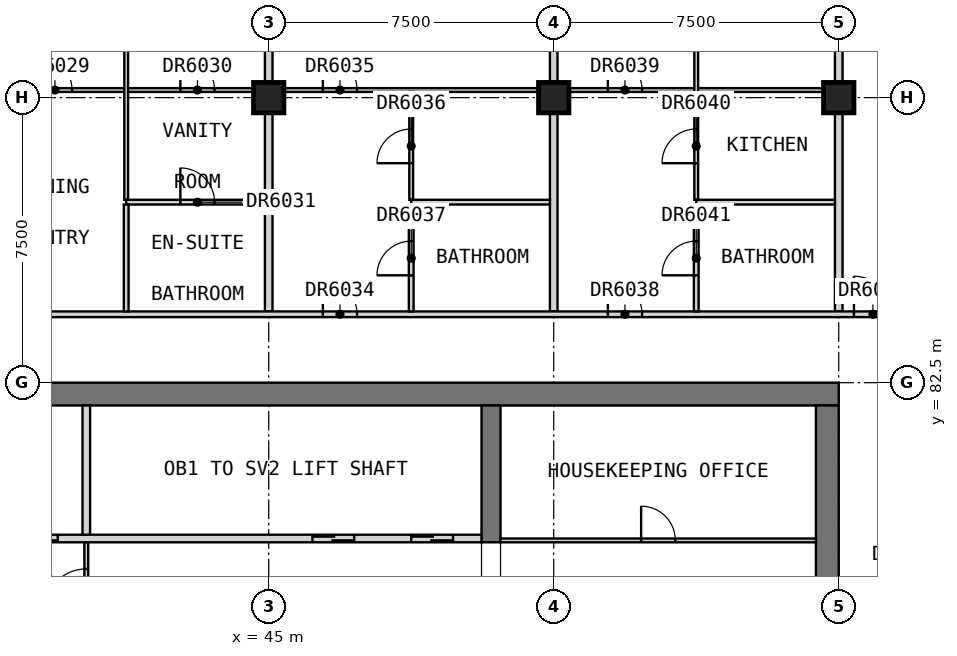
"""IFC4 building model, lengths in metres.
Left out: names, types, materials, properties, quantities, classifications, styles, units other than length and angle.
Written with IfcOpenShell. Run it as: python <this file> out.ifc"""

import sys

from ifc_helpers import new_model, si_unit, direction, frame, frame_2d, origin, origin_2d, place, context, subcontext, project, spatial, rectangle, extrude, element, fill, save


model = new_model("IFC4")
c1 = context("Model", 3, precision=1e-05, world=origin(), true_north=direction((0.0, 1.0)))
c2 = subcontext(c1, "Body", "Model", "MODEL_VIEW")
j1 = project(units=[si_unit("LENGTHUNIT", "METRE"), si_unit("PLANEANGLEUNIT", "RADIAN")], contexts=[c1])
p1 = place(None, origin())
s1 = spatial("IfcSite", under=j1, at=p1, CompositionType="ELEMENT")
p2 = place(p1, origin())
s2 = spatial("IfcBuilding", under=s1, at=p2, CompositionType="ELEMENT")
p3 = place(p2, frame((0.0, 0.0, 226.7)))
s3 = spatial("IfcBuildingStorey", under=s2, at=p3, CompositionType="ELEMENT", Elevation=226.7)
for number, where, z_axis, x_axis in (
    (1, (45.0, 90.0, 0.0), (0.0, 0.0, 1.0), (1.0, 0.0, 0.0)),
    (2, (52.5, 90.0, 0.0), (0.0, 0.0, 1.0), (1.0, 0.0, 0.0)),
    (3, (60.0, 90.0, 0.0), (0.0, 0.0, 1.0), (1.0, 0.0, 0.0)),
):
    element("IfcColumn", number, at=place(p3, frame(where, z_axis=z_axis, x_axis=x_axis)), inside=s3, PredefinedType="COLUMN", context=c2, shape_type="SweptSolid", body=[
        extrude(rectangle(XDim=0.8, YDim=0.8, at=origin_2d()), origin(), (0.0, 0.0, 1.0), 3.5),
    ])
p4 = place(p3, frame((30.0, 82.2, 0.0), z_axis=(0.0, 0.0, 1.0), x_axis=(1.0, 0.0, 0.0)))
e4 = element("IfcWall", 4, at=p4, inside=s3, PredefinedType="SHEAR", context=c2, shape_type="SweptSolid", body=[
    extrude(rectangle(XDim=30.0, YDim=0.6, at=frame_2d((15.0, 0.0))), origin(), (0.0, 0.0, 1.0), 3.5),
])
p5 = place(p3, frame((59.7, 60.6, 0.0), z_axis=(0.0, 0.0, 1.0), x_axis=(0.0, 1.0, 0.0)))
e5 = element("IfcWall", 5, at=p5, inside=s3, PredefinedType="SHEAR", context=c2, shape_type="SweptSolid", body=[
    extrude(rectangle(XDim=21.3, YDim=0.6, at=frame_2d((10.65, 0.0))), origin(), (0.0, 0.0, 1.0), 3.5),
])
p6 = place(p5, frame((14.9, 0.0, 0.0)))
e6 = element("IfcOpeningElement", 6, at=p6, cuts=e5, PredefinedType="OPENING", context=c2, shape_type="SweptSolid", body=[
    extrude(rectangle(XDim=1.8, YDim=2.1, at=frame_2d((0.9, 1.05))), frame((0.0, 0.31, 0.0), z_axis=(0.0, -1.0, 0.0), x_axis=(1.0, 0.0, 0.0)), (0.0, 0.0, 1.0), 0.62),
])
p7 = place(p3, frame((50.85, 78.3, 0.0), z_axis=(0.0, 0.0, 1.0), x_axis=(0.0, 1.0, 0.0)))
e7 = element("IfcWall", 7, at=p7, inside=s3, PredefinedType="SHEAR", context=c2, shape_type="SweptSolid", body=[
    extrude(rectangle(XDim=3.6, YDim=0.5, at=frame_2d((1.8, 0.0))), origin(), (0.0, 0.0, 1.0), 3.5),
])
p8 = place(p3, frame((35.0, 78.4, 0.0), z_axis=(0.0, 0.0, 1.0), x_axis=(1.0, 0.0, 0.0)))
e8 = element("IfcWall", 8, at=p8, inside=s3, PredefinedType="SOLIDWALL", context=c2, shape_type="SweptSolid", body=[
    extrude(rectangle(XDim=15.6, YDim=0.2, at=frame_2d((7.8, 0.0))), origin(), (0.0, 0.0, 1.0), 3.5),
])
p9 = place(p8, frame((0.75, 0.0, 0.0)))
e9 = element("IfcOpeningElement", 9, at=p9, cuts=e8, PredefinedType="OPENING", context=c2, shape_type="SweptSolid", body=[
    extrude(rectangle(XDim=1.1, YDim=2.1, at=frame_2d((0.55, 1.05))), frame((0.0, 0.11, 0.0), z_axis=(0.0, -1.0, 0.0), x_axis=(1.0, 0.0, 0.0)), (0.0, 0.0, 1.0), 0.22),
])
p10 = place(p8, frame((3.35, 0.0, 0.0)))
e10 = element("IfcOpeningElement", 10, at=p10, cuts=e8, PredefinedType="OPENING", context=c2, shape_type="SweptSolid", body=[
    extrude(rectangle(XDim=1.1, YDim=2.1, at=frame_2d((0.55, 1.05))), frame((0.0, 0.11, 0.0), z_axis=(0.0, -1.0, 0.0), x_axis=(1.0, 0.0, 0.0)), (0.0, 0.0, 1.0), 0.22),
])
p11 = place(p8, frame((11.15, 0.0, 0.0)))
e11 = element("IfcOpeningElement", 11, at=p11, cuts=e8, PredefinedType="OPENING", context=c2, shape_type="SweptSolid", body=[
    extrude(rectangle(XDim=1.1, YDim=2.1, at=frame_2d((0.55, 1.05))), frame((0.0, 0.11, 0.0), z_axis=(0.0, -1.0, 0.0), x_axis=(1.0, 0.0, 0.0)), (0.0, 0.0, 1.0), 0.22),
])
p12 = place(p8, frame((13.75, 0.0, 0.0)))
e12 = element("IfcOpeningElement", 12, at=p12, cuts=e8, PredefinedType="OPENING", context=c2, shape_type="SweptSolid", body=[
    extrude(rectangle(XDim=1.1, YDim=2.1, at=frame_2d((0.55, 1.05))), frame((0.0, 0.11, 0.0), z_axis=(0.0, -1.0, 0.0), x_axis=(1.0, 0.0, 0.0)), (0.0, 0.0, 1.0), 0.22),
])
p13 = place(p3, frame((40.2, 78.5, 0.0), z_axis=(0.0, 0.0, 1.0), x_axis=(0.0, 1.0, 0.0)))
e13 = element("IfcWall", 13, at=p13, inside=s3, PredefinedType="SOLIDWALL", context=c2, shape_type="SweptSolid", body=[
    extrude(rectangle(XDim=3.4, YDim=0.2, at=frame_2d((1.7, 0.0))), origin(), (0.0, 0.0, 1.0), 3.5),
])
p14 = place(p3, frame((40.2, 75.3, 0.0), z_axis=(0.0, 0.0, 1.0), x_axis=(0.0, 1.0, 0.0)))
e14 = element("IfcWall", 14, at=p14, inside=s3, PredefinedType="PARTITIONING", context=c2, shape_type="SweptSolid", body=[
    extrude(rectangle(XDim=3.0, YDim=0.1, at=frame_2d((1.5, 0.0))), origin(), (0.0, 0.0, 1.0), 3.25),
])
p15 = place(p14, frame((1.2, 0.0, 0.0)))
e15 = element("IfcOpeningElement", 15, at=p15, cuts=e14, PredefinedType="OPENING", context=c2, shape_type="SweptSolid", body=[
    extrude(rectangle(XDim=1.1, YDim=2.1, at=frame_2d((0.55, 1.05))), frame((0.0, 0.06, 0.0), z_axis=(0.0, -1.0, 0.0), x_axis=(1.0, 0.0, 0.0)), (0.0, 0.0, 1.0), 0.12),
])
p16 = place(p3, frame((51.1, 78.35, 0.0), z_axis=(0.0, 0.0, 1.0), x_axis=(1.0, 0.0, 0.0)))
e16 = element("IfcWall", 16, at=p16, inside=s3, PredefinedType="PARTITIONING", context=c2, shape_type="SweptSolid", body=[
    extrude(rectangle(XDim=8.3, YDim=0.1, at=frame_2d((4.15, 0.0))), origin(), (0.0, 0.0, 1.0), 3.25),
])
p17 = place(p16, frame((3.7, 0.0, 0.0)))
e17 = element("IfcOpeningElement", 17, at=p17, cuts=e16, PredefinedType="OPENING", context=c2, shape_type="SweptSolid", body=[
    extrude(rectangle(XDim=0.9, YDim=2.1, at=frame_2d((0.45, 1.05))), frame((0.0, 0.06, 0.0), z_axis=(0.0, -1.0, 0.0), x_axis=(1.0, 0.0, 0.0)), (0.0, 0.0, 1.0), 0.12),
])
for number, where, z_axis, x_axis in (
    (18, (45.0, 84.375, 0.0), (0.0, 0.0, 1.0), (0.0, 1.0, 0.0)),
    (19, (52.5, 84.375, 0.0), (0.0, 0.0, 1.0), (0.0, 1.0, 0.0)),
    (20, (60.0, 84.375, 0.0), (0.0, 0.0, 1.0), (0.0, 1.0, 0.0)),
):
    element("IfcWall", number, at=place(p3, frame(where, z_axis=z_axis, x_axis=x_axis)), inside=s3, PredefinedType="PARTITIONING", context=c2, shape_type="SweptSolid", body=[
        extrude(rectangle(XDim=13.125, YDim=0.2, at=frame_2d((6.562, 0.0))), origin(), (0.0, 0.0, 1.0), 3.25),
    ])
p18 = place(p3, frame((33.75, 84.3, 0.0), z_axis=(0.0, 0.0, 1.0), x_axis=(1.0, 0.0, 0.0)))
e21 = element("IfcWall", 21, at=p18, inside=s3, PredefinedType="PARTITIONING", context=c2, shape_type="SweptSolid", body=[
    extrude(rectangle(XDim=28.05, YDim=0.15, at=frame_2d((14.025, 0.0))), origin(), (0.0, 0.0, 1.0), 3.25),
])
p19 = place(p18, frame((12.675, 0.0, 0.0)))
e22 = element("IfcOpeningElement", 22, at=p19, cuts=e21, PredefinedType="OPENING", context=c2, shape_type="SweptSolid", body=[
    extrude(rectangle(XDim=0.9, YDim=2.1, at=frame_2d((0.45, 1.05))), frame((0.0, 0.085, 0.0), z_axis=(0.0, -1.0, 0.0), x_axis=(1.0, 0.0, 0.0)), (0.0, 0.0, 1.0), 0.17),
])
p20 = place(p18, frame((20.175, 0.0, 0.0)))
e23 = element("IfcOpeningElement", 23, at=p20, cuts=e21, PredefinedType="OPENING", context=c2, shape_type="SweptSolid", body=[
    extrude(rectangle(XDim=0.9, YDim=2.1, at=frame_2d((0.45, 1.05))), frame((0.0, 0.085, 0.0), z_axis=(0.0, -1.0, 0.0), x_axis=(1.0, 0.0, 0.0)), (0.0, 0.0, 1.0), 0.17),
])
p21 = place(p18, frame((26.65, 0.0, 0.0)))
e24 = element("IfcOpeningElement", 24, at=p21, cuts=e21, PredefinedType="OPENING", context=c2, shape_type="SweptSolid", body=[
    extrude(rectangle(XDim=1.0, YDim=2.1, at=frame_2d((0.5, 1.05))), frame((0.0, 0.085, 0.0), z_axis=(0.0, -1.0, 0.0), x_axis=(1.0, 0.0, 0.0)), (0.0, 0.0, 1.0), 0.17),
])
p22 = place(p3, frame((30.0, 90.2, 0.0), z_axis=(0.0, 0.0, 1.0), x_axis=(1.0, 0.0, 0.0)))
e25 = element("IfcWall", 25, at=p22, inside=s3, PredefinedType="PARTITIONING", context=c2, shape_type="SweptSolid", body=[
    extrude(rectangle(XDim=29.9, YDim=0.1, at=frame_2d((14.95, 0.0))), origin(), (0.0, 0.0, 1.0), 2.75),
])
p23 = place(p22, frame((1.425, 0.0, 0.0)))
e26 = element("IfcOpeningElement", 26, at=p23, cuts=e25, PredefinedType="OPENING", context=c2, shape_type="SweptSolid", body=[
    extrude(rectangle(XDim=0.9, YDim=2.1, at=frame_2d((0.45, 1.05))), frame((0.0, 0.06, 0.0), z_axis=(0.0, -1.0, 0.0), x_axis=(1.0, 0.0, 0.0)), (0.0, 0.0, 1.0), 0.12),
])
p24 = place(p22, frame((8.925, 0.0, 0.0)))
e27 = element("IfcOpeningElement", 27, at=p24, cuts=e25, PredefinedType="OPENING", context=c2, shape_type="SweptSolid", body=[
    extrude(rectangle(XDim=0.9, YDim=2.1, at=frame_2d((0.45, 1.05))), frame((0.0, 0.06, 0.0), z_axis=(0.0, -1.0, 0.0), x_axis=(1.0, 0.0, 0.0)), (0.0, 0.0, 1.0), 0.12),
])
p25 = place(p22, frame((12.675, 0.0, 0.0)))
e28 = element("IfcOpeningElement", 28, at=p25, cuts=e25, PredefinedType="OPENING", context=c2, shape_type="SweptSolid", body=[
    extrude(rectangle(XDim=0.9, YDim=2.1, at=frame_2d((0.45, 1.05))), frame((0.0, 0.06, 0.0), z_axis=(0.0, -1.0, 0.0), x_axis=(1.0, 0.0, 0.0)), (0.0, 0.0, 1.0), 0.12),
])
p26 = place(p22, frame((16.425, 0.0, 0.0)))
e29 = element("IfcOpeningElement", 29, at=p26, cuts=e25, PredefinedType="OPENING", context=c2, shape_type="SweptSolid", body=[
    extrude(rectangle(XDim=0.9, YDim=2.1, at=frame_2d((0.45, 1.05))), frame((0.0, 0.06, 0.0), z_axis=(0.0, -1.0, 0.0), x_axis=(1.0, 0.0, 0.0)), (0.0, 0.0, 1.0), 0.12),
])
p27 = place(p22, frame((23.925, 0.0, 0.0)))
e30 = element("IfcOpeningElement", 30, at=p27, cuts=e25, PredefinedType="OPENING", context=c2, shape_type="SweptSolid", body=[
    extrude(rectangle(XDim=0.9, YDim=2.1, at=frame_2d((0.45, 1.05))), frame((0.0, 0.06, 0.0), z_axis=(0.0, -1.0, 0.0), x_axis=(1.0, 0.0, 0.0)), (0.0, 0.0, 1.0), 0.12),
])
p28 = place(p3, frame((41.25, 87.312, 0.0), z_axis=(0.0, 0.0, 1.0), x_axis=(0.0, 1.0, 0.0)))
e31 = element("IfcWall", 31, at=p28, inside=s3, PredefinedType="PARTITIONING", context=c2, shape_type="SweptSolid", body=[
    extrude(rectangle(XDim=9.377, YDim=0.1, at=frame_2d((4.689, 0.0))), origin(), (0.0, 0.0, 1.0), 3.25),
])
p29 = place(p28, frame((6.087, 0.0, 0.0)))
e32 = element("IfcOpeningElement", 32, at=p29, cuts=e31, PredefinedType="OPENING", context=c2, shape_type="SweptSolid", body=[
    extrude(rectangle(XDim=0.9, YDim=2.1, at=frame_2d((0.45, 1.05))), frame((0.0, 0.06, 0.0), z_axis=(0.0, -1.0, 0.0), x_axis=(1.0, 0.0, 0.0)), (0.0, 0.0, 1.0), 0.12),
])
p30 = place(p3, frame((48.75, 87.312, 0.0), z_axis=(0.0, 0.0, 1.0), x_axis=(0.0, 1.0, 0.0)))
e33 = element("IfcWall", 33, at=p30, inside=s3, PredefinedType="PARTITIONING", context=c2, shape_type="SweptSolid", body=[
    extrude(rectangle(XDim=2.837, YDim=0.1, at=frame_2d((1.419, 0.0))), origin(), (0.0, 0.0, 1.0), 3.25),
])
p31 = place(p30, frame((0.962, 0.0, 0.0)))
e34 = element("IfcOpeningElement", 34, at=p31, cuts=e33, PredefinedType="OPENING", context=c2, shape_type="SweptSolid", body=[
    extrude(rectangle(XDim=0.9, YDim=2.1, at=frame_2d((0.45, 1.05))), frame((0.0, 0.06, 0.0), z_axis=(0.0, -1.0, 0.0), x_axis=(1.0, 0.0, 0.0)), (0.0, 0.0, 1.0), 0.12),
])
p32 = place(p3, frame((56.25, 87.312, 0.0), z_axis=(0.0, 0.0, 1.0), x_axis=(0.0, 1.0, 0.0)))
e35 = element("IfcWall", 35, at=p32, inside=s3, PredefinedType="PARTITIONING", context=c2, shape_type="SweptSolid", body=[
    extrude(rectangle(XDim=9.377, YDim=0.1, at=frame_2d((4.689, 0.0))), origin(), (0.0, 0.0, 1.0), 3.25),
])
p33 = place(p32, frame((0.962, 0.0, 0.0)))
e36 = element("IfcOpeningElement", 36, at=p33, cuts=e35, PredefinedType="OPENING", context=c2, shape_type="SweptSolid", body=[
    extrude(rectangle(XDim=0.9, YDim=2.1, at=frame_2d((0.45, 1.05))), frame((0.0, 0.06, 0.0), z_axis=(0.0, -1.0, 0.0), x_axis=(1.0, 0.0, 0.0)), (0.0, 0.0, 1.0), 0.12),
])
p34 = place(p32, frame((6.087, 0.0, 0.0)))
e37 = element("IfcOpeningElement", 37, at=p34, cuts=e35, PredefinedType="OPENING", context=c2, shape_type="SweptSolid", body=[
    extrude(rectangle(XDim=0.9, YDim=2.1, at=frame_2d((0.45, 1.05))), frame((0.0, 0.06, 0.0), z_axis=(0.0, -1.0, 0.0), x_axis=(1.0, 0.0, 0.0)), (0.0, 0.0, 1.0), 0.12),
])
p35 = place(p3, frame((41.25, 87.25, 0.0), z_axis=(0.0, 0.0, 1.0), x_axis=(1.0, 0.0, 0.0)))
e38 = element("IfcWall", 38, at=p35, inside=s3, PredefinedType="PARTITIONING", context=c2, shape_type="SweptSolid", body=[
    extrude(rectangle(XDim=3.65, YDim=0.125, at=frame_2d((1.825, 0.0))), origin(), (0.0, 0.0, 1.0), 3.25),
])
p36 = place(p35, frame((1.425, 0.0, 0.0)))
e39 = element("IfcOpeningElement", 39, at=p36, cuts=e38, PredefinedType="OPENING", context=c2, shape_type="SweptSolid", body=[
    extrude(rectangle(XDim=0.9, YDim=2.1, at=frame_2d((0.45, 1.05))), frame((0.0, 0.073, 0.0), z_axis=(0.0, -1.0, 0.0), x_axis=(1.0, 0.0, 0.0)), (0.0, 0.0, 1.0), 0.145),
])
for number, where, z_axis, x_axis in (
    (40, (48.75, 87.25, 0.0), (0.0, 0.0, 1.0), (1.0, 0.0, 0.0)),
    (41, (56.25, 87.25, 0.0), (0.0, 0.0, 1.0), (1.0, 0.0, 0.0)),
):
    element("IfcWall", number, at=place(p3, frame(where, z_axis=z_axis, x_axis=x_axis)), inside=s3, PredefinedType="PARTITIONING", context=c2, shape_type="SweptSolid", body=[
        extrude(rectangle(XDim=3.65, YDim=0.125, at=frame_2d((1.825, 0.0))), origin(), (0.0, 0.0, 1.0), 3.25),
    ])
p37 = place(p3, frame((41.25, 84.375, 0.0), z_axis=(0.0, 0.0, 1.0), x_axis=(0.0, 1.0, 0.0)))
e42 = element("IfcWall", 42, at=p37, inside=s3, PredefinedType="PARTITIONING", context=c2, shape_type="SweptSolid", body=[
    extrude(rectangle(XDim=2.812, YDim=0.125, at=frame_2d((1.406, 0.0))), origin(), (0.0, 0.0, 1.0), 3.25),
])
p38 = place(p3, frame((48.75, 84.375, 0.0), z_axis=(0.0, 0.0, 1.0), x_axis=(0.0, 1.0, 0.0)))
e43 = element("IfcWall", 43, at=p38, inside=s3, PredefinedType="PARTITIONING", context=c2, shape_type="SweptSolid", body=[
    extrude(rectangle(XDim=2.812, YDim=0.125, at=frame_2d((1.406, 0.0))), origin(), (0.0, 0.0, 1.0), 3.25),
])
p39 = place(p38, frame((0.95, 0.0, 0.0)))
e44 = element("IfcOpeningElement", 44, at=p39, cuts=e43, PredefinedType="OPENING", context=c2, shape_type="SweptSolid", body=[
    extrude(rectangle(XDim=0.9, YDim=2.1, at=frame_2d((0.45, 1.05))), frame((0.0, 0.073, 0.0), z_axis=(0.0, -1.0, 0.0), x_axis=(1.0, 0.0, 0.0)), (0.0, 0.0, 1.0), 0.145),
])
p40 = place(p3, frame((56.25, 84.375, 0.0), z_axis=(0.0, 0.0, 1.0), x_axis=(0.0, 1.0, 0.0)))
e45 = element("IfcWall", 45, at=p40, inside=s3, PredefinedType="PARTITIONING", context=c2, shape_type="SweptSolid", body=[
    extrude(rectangle(XDim=2.812, YDim=0.125, at=frame_2d((1.406, 0.0))), origin(), (0.0, 0.0, 1.0), 3.25),
])
p41 = place(p40, frame((0.95, 0.0, 0.0)))
e46 = element("IfcOpeningElement", 46, at=p41, cuts=e45, PredefinedType="OPENING", context=c2, shape_type="SweptSolid", body=[
    extrude(rectangle(XDim=0.9, YDim=2.1, at=frame_2d((0.45, 1.05))), frame((0.0, 0.073, 0.0), z_axis=(0.0, -1.0, 0.0), x_axis=(1.0, 0.0, 0.0)), (0.0, 0.0, 1.0), 0.145),
])
p42 = place(p10, origin())
e47 = element("IfcDoor", 47, at=p42, inside=s3, OperationType="DOUBLE_DOOR_SLIDING", PredefinedType="DOOR", context=c2, shape_type="SweptSolid", body=[
    extrude(rectangle(XDim=1.1, YDim=2.1, at=frame_2d((0.55, 1.05))), frame((0.0, 0.025, 0.0), z_axis=(0.0, -1.0, 0.0), x_axis=(1.0, 0.0, 0.0)), (0.0, 0.0, 1.0), 0.05),
])
fill(e10, e47)
p43 = place(p11, origin())
e48 = element("IfcDoor", 48, at=p43, inside=s3, OperationType="DOUBLE_DOOR_SLIDING", PredefinedType="DOOR", context=c2, shape_type="SweptSolid", body=[
    extrude(rectangle(XDim=1.1, YDim=2.1, at=frame_2d((0.55, 1.05))), frame((0.0, 0.025, 0.0), z_axis=(0.0, -1.0, 0.0), x_axis=(1.0, 0.0, 0.0)), (0.0, 0.0, 1.0), 0.05),
])
fill(e11, e48)
p44 = place(p12, origin())
e49 = element("IfcDoor", 49, at=p44, inside=s3, OperationType="DOUBLE_DOOR_SLIDING", PredefinedType="DOOR", context=c2, shape_type="SweptSolid", body=[
    extrude(rectangle(XDim=1.1, YDim=2.1, at=frame_2d((0.55, 1.05))), frame((0.0, 0.025, 0.0), z_axis=(0.0, -1.0, 0.0), x_axis=(1.0, 0.0, 0.0)), (0.0, 0.0, 1.0), 0.05),
])
fill(e12, e49)
p45 = place(p15, origin())
e50 = element("IfcDoor", 50, at=p45, inside=s3, OperationType="SINGLE_SWING_LEFT", PredefinedType="DOOR", context=c2, shape_type="SweptSolid", body=[
    extrude(rectangle(XDim=1.1, YDim=2.1, at=frame_2d((0.55, 1.05))), frame((0.0, 0.025, 0.0), z_axis=(0.0, -1.0, 0.0), x_axis=(1.0, 0.0, 0.0)), (0.0, 0.0, 1.0), 0.05),
])
fill(e15, e50)
p46 = place(p17, origin())
e51 = element("IfcDoor", 51, at=p46, inside=s3, OperationType="SINGLE_SWING_RIGHT", PredefinedType="DOOR", context=c2, shape_type="SweptSolid", body=[
    extrude(rectangle(XDim=0.9, YDim=2.1, at=frame_2d((0.45, 1.05))), frame((0.0, 0.025, 0.0), z_axis=(0.0, -1.0, 0.0), x_axis=(1.0, 0.0, 0.0)), (0.0, 0.0, 1.0), 0.05),
])
fill(e17, e51)
p47 = place(p24, origin())
e52 = element("IfcDoor", 52, at=p47, inside=s3, OperationType="SINGLE_SWING_RIGHT", PredefinedType="DOOR", context=c2, shape_type="SweptSolid", body=[
    extrude(rectangle(XDim=0.9, YDim=2.1, at=frame_2d((0.45, 1.05))), frame((0.0, 0.025, 0.0), z_axis=(0.0, -1.0, 0.0), x_axis=(1.0, 0.0, 0.0)), (0.0, 0.0, 1.0), 0.05),
])
fill(e27, e52)
p48 = place(p25, origin())
e53 = element("IfcDoor", 53, at=p48, inside=s3, OperationType="SINGLE_SWING_RIGHT", PredefinedType="DOOR", context=c2, shape_type="SweptSolid", body=[
    extrude(rectangle(XDim=0.9, YDim=2.1, at=frame_2d((0.45, 1.05))), frame((0.0, 0.025, 0.0), z_axis=(0.0, -1.0, 0.0), x_axis=(1.0, 0.0, 0.0)), (0.0, 0.0, 1.0), 0.05),
])
fill(e28, e53)
p49 = place(p36, origin())
e54 = element("IfcDoor", 54, at=p49, inside=s3, OperationType="SINGLE_SWING_RIGHT", PredefinedType="DOOR", context=c2, shape_type="SweptSolid", body=[
    extrude(rectangle(XDim=0.9, YDim=2.1, at=frame_2d((0.45, 1.05))), frame((0.0, 0.025, 0.0), z_axis=(0.0, -1.0, 0.0), x_axis=(1.0, 0.0, 0.0)), (0.0, 0.0, 1.0), 0.05),
])
fill(e39, e54)
p50 = place(p19, origin())
e55 = element("IfcDoor", 55, at=p50, inside=s3, OperationType="SINGLE_SWING_LEFT", PredefinedType="DOOR", context=c2, shape_type="SweptSolid", body=[
    extrude(rectangle(XDim=0.9, YDim=2.1, at=frame_2d((0.45, 1.05))), frame((0.0, 0.025, 0.0), z_axis=(0.0, -1.0, 0.0), x_axis=(1.0, 0.0, 0.0)), (0.0, 0.0, 1.0), 0.05),
])
fill(e22, e55)
p51 = place(p26, origin())
e56 = element("IfcDoor", 56, at=p51, inside=s3, OperationType="SINGLE_SWING_RIGHT", PredefinedType="DOOR", context=c2, shape_type="SweptSolid", body=[
    extrude(rectangle(XDim=0.9, YDim=2.1, at=frame_2d((0.45, 1.05))), frame((0.0, 0.025, 0.0), z_axis=(0.0, -1.0, 0.0), x_axis=(1.0, 0.0, 0.0)), (0.0, 0.0, 1.0), 0.05),
])
fill(e29, e56)
p52 = place(p31, origin())
e57 = element("IfcDoor", 57, at=p52, inside=s3, OperationType="SINGLE_SWING_RIGHT", PredefinedType="DOOR", context=c2, shape_type="SweptSolid", body=[
    extrude(rectangle(XDim=0.9, YDim=2.1, at=frame_2d((0.45, 1.05))), frame((0.0, 0.025, 0.0), z_axis=(0.0, -1.0, 0.0), x_axis=(1.0, 0.0, 0.0)), (0.0, 0.0, 1.0), 0.05),
])
fill(e34, e57)
p53 = place(p39, origin())
e58 = element("IfcDoor", 58, at=p53, inside=s3, OperationType="SINGLE_SWING_RIGHT", PredefinedType="DOOR", context=c2, shape_type="SweptSolid", body=[
    extrude(rectangle(XDim=0.9, YDim=2.1, at=frame_2d((0.45, 1.05))), frame((0.0, 0.025, 0.0), z_axis=(0.0, -1.0, 0.0), x_axis=(1.0, 0.0, 0.0)), (0.0, 0.0, 1.0), 0.05),
])
fill(e44, e58)
p54 = place(p20, origin())
e59 = element("IfcDoor", 59, at=p54, inside=s3, OperationType="SINGLE_SWING_LEFT", PredefinedType="DOOR", context=c2, shape_type="SweptSolid", body=[
    extrude(rectangle(XDim=0.9, YDim=2.1, at=frame_2d((0.45, 1.05))), frame((0.0, 0.025, 0.0), z_axis=(0.0, -1.0, 0.0), x_axis=(1.0, 0.0, 0.0)), (0.0, 0.0, 1.0), 0.05),
])
fill(e23, e59)
p55 = place(p27, origin())
e60 = element("IfcDoor", 60, at=p55, inside=s3, OperationType="SINGLE_SWING_RIGHT", PredefinedType="DOOR", context=c2, shape_type="SweptSolid", body=[
    extrude(rectangle(XDim=0.9, YDim=2.1, at=frame_2d((0.45, 1.05))), frame((0.0, 0.025, 0.0), z_axis=(0.0, -1.0, 0.0), x_axis=(1.0, 0.0, 0.0)), (0.0, 0.0, 1.0), 0.05),
])
fill(e30, e60)
p56 = place(p33, origin())
e61 = element("IfcDoor", 61, at=p56, inside=s3, OperationType="SINGLE_SWING_RIGHT", PredefinedType="DOOR", context=c2, shape_type="SweptSolid", body=[
    extrude(rectangle(XDim=0.9, YDim=2.1, at=frame_2d((0.45, 1.05))), frame((0.0, 0.025, 0.0), z_axis=(0.0, -1.0, 0.0), x_axis=(1.0, 0.0, 0.0)), (0.0, 0.0, 1.0), 0.05),
])
fill(e36, e61)
p57 = place(p41, origin())
e62 = element("IfcDoor", 62, at=p57, inside=s3, OperationType="SINGLE_SWING_RIGHT", PredefinedType="DOOR", context=c2, shape_type="SweptSolid", body=[
    extrude(rectangle(XDim=0.9, YDim=2.1, at=frame_2d((0.45, 1.05))), frame((0.0, 0.025, 0.0), z_axis=(0.0, -1.0, 0.0), x_axis=(1.0, 0.0, 0.0)), (0.0, 0.0, 1.0), 0.05),
])
fill(e46, e62)
p58 = place(p21, origin())
e63 = element("IfcDoor", 63, at=p58, inside=s3, OperationType="SINGLE_SWING_LEFT", PredefinedType="DOOR", context=c2, shape_type="SweptSolid", body=[
    extrude(rectangle(XDim=1.0, YDim=2.1, at=frame_2d((0.5, 1.05))), frame((0.0, 0.025, 0.0), z_axis=(0.0, -1.0, 0.0), x_axis=(1.0, 0.0, 0.0)), (0.0, 0.0, 1.0), 0.05),
])
fill(e24, e63)
save(model, sys.argv[1])
